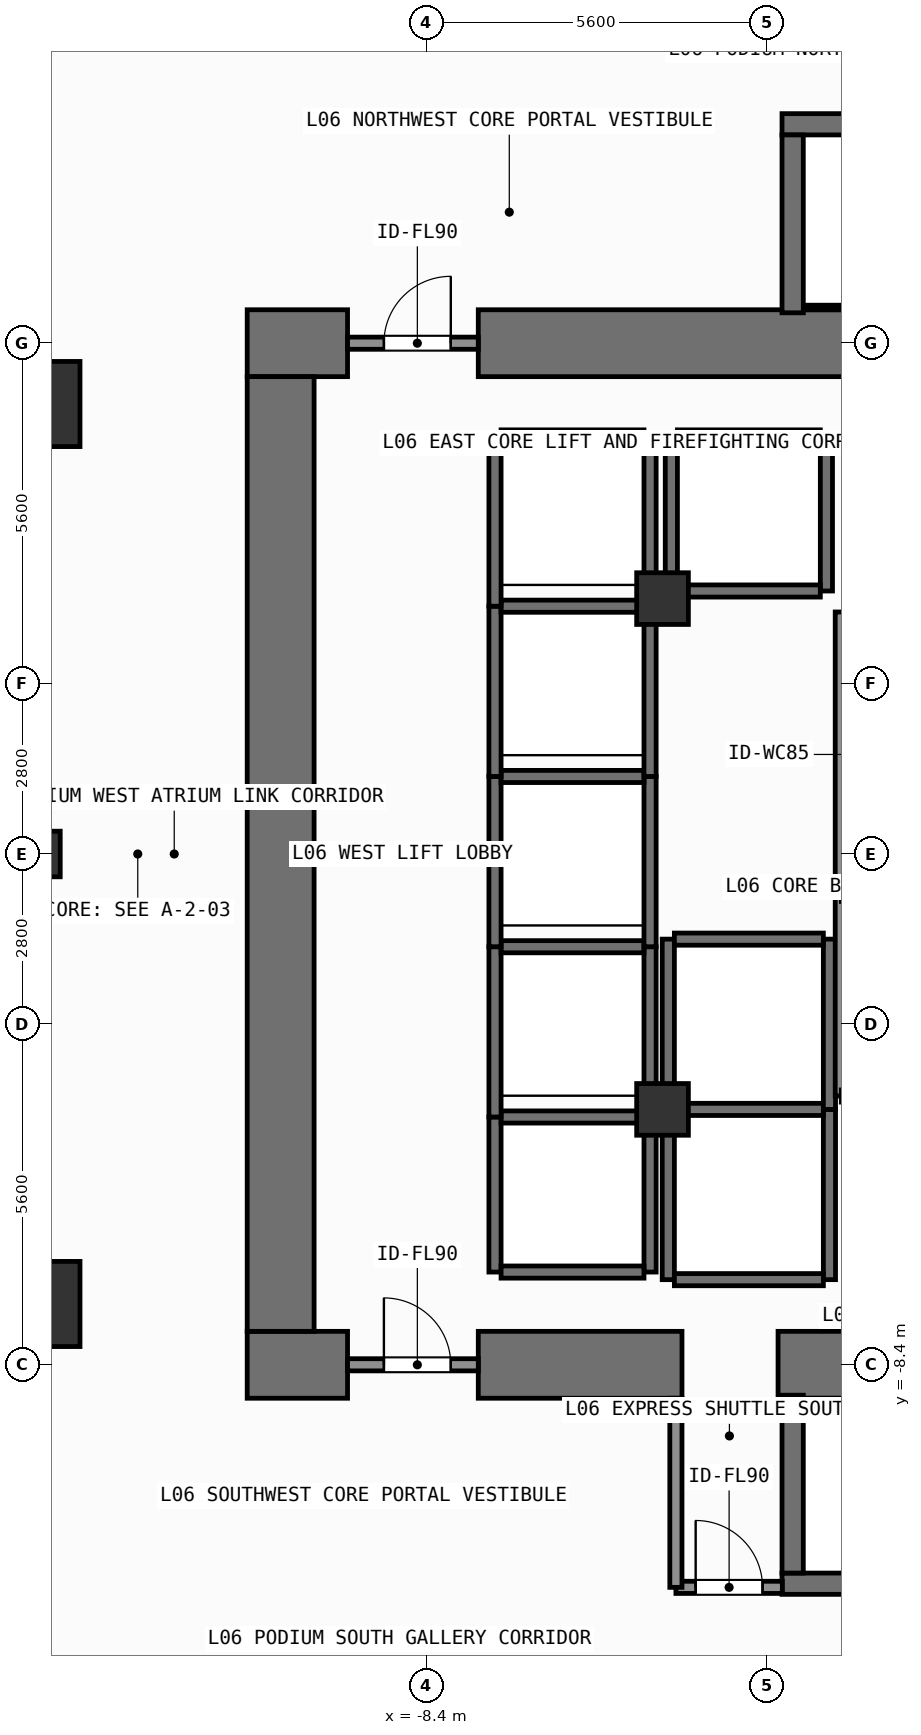
"""IFC4 building model, lengths in metres.
Left out: names, types, materials, properties, quantities, classifications, styles, units other than length and angle.
Written with IfcOpenShell. Run it as: python <this file> out.ifc"""

import sys

from ifc_helpers import new_model, si_unit, direction, frame, frame_2d, origin, origin_2d, place, context, subcontext, project, spatial, rectangle, extrude, element, fill, save


model = new_model("IFC4")
c1 = context("Model", 3, precision=1e-05, world=origin(), true_north=direction((0.0, 1.0)))
c2 = subcontext(c1, "Body", "Model", "MODEL_VIEW")
j1 = project(units=[si_unit("LENGTHUNIT", "METRE"), si_unit("PLANEANGLEUNIT", "RADIAN")], contexts=[c1])
p1 = place(None, origin())
s1 = spatial("IfcSite", under=j1, at=p1, CompositionType="ELEMENT")
p2 = place(p1, origin())
s2 = spatial("IfcBuilding", under=s1, at=p2, CompositionType="ELEMENT")
p3 = place(p2, frame((0.0, 0.0, 21.6)))
s3 = spatial("IfcBuildingStorey", under=s2, at=p3, CompositionType="ELEMENT", Elevation=21.6)
p4 = place(p3, frame((-11.35, -8.4, 0.0), z_axis=(0.0, 0.0, 1.0), x_axis=(1.0, 0.0, 0.0)))
e1 = element("IfcWall", 1, at=p4, inside=s3, PredefinedType="SHEAR", context=c2, shape_type="SweptSolid", body=[
    extrude(rectangle(XDim=1.65, YDim=1.1, at=frame_2d((0.825, 0.0))), origin(), (0.0, 0.0, 1.0), 4.8),
])
p5 = place(p3, frame((-7.55, -8.4, 0.0), z_axis=(0.0, 0.0, 1.0), x_axis=(1.0, 0.0, 0.0)))
e2 = element("IfcWall", 2, at=p5, inside=s3, PredefinedType="SHEAR", context=c2, shape_type="SweptSolid", body=[
    extrude(rectangle(XDim=3.35, YDim=1.1, at=frame_2d((1.675, 0.0))), origin(), (0.0, 0.0, 1.0), 4.8),
])
p6 = place(p3, frame((-2.62, -8.4, 0.0), z_axis=(0.0, 0.0, 1.0), x_axis=(1.0, 0.0, 0.0)))
e3 = element("IfcWall", 3, at=p6, inside=s3, PredefinedType="SHEAR", context=c2, shape_type="SweptSolid", body=[
    extrude(rectangle(XDim=7.27, YDim=1.1, at=frame_2d((3.635, 0.0))), origin(), (0.0, 0.0, 1.0), 4.8),
])
p7 = place(p3, frame((-11.35, 8.4, 0.0), z_axis=(0.0, 0.0, 1.0), x_axis=(1.0, 0.0, 0.0)))
e4 = element("IfcWall", 4, at=p7, inside=s3, PredefinedType="SHEAR", context=c2, shape_type="SweptSolid", body=[
    extrude(rectangle(XDim=1.65, YDim=1.1, at=frame_2d((0.825, 0.0))), origin(), (0.0, 0.0, 1.0), 4.8),
])
p8 = place(p3, frame((-7.55, 8.4, 0.0), z_axis=(0.0, 0.0, 1.0), x_axis=(1.0, 0.0, 0.0)))
e5 = element("IfcWall", 5, at=p8, inside=s3, PredefinedType="SHEAR", context=c2, shape_type="SweptSolid", body=[
    extrude(rectangle(XDim=16.5, YDim=1.1, at=frame_2d((8.25, 0.0))), origin(), (0.0, 0.0, 1.0), 4.8),
])
p9 = place(p3, frame((-10.8, -7.85, 0.0), z_axis=(0.0, 0.0, 1.0), x_axis=(0.0, 1.0, 0.0)))
e6 = element("IfcWall", 6, at=p9, inside=s3, PredefinedType="SHEAR", context=c2, shape_type="SweptSolid", body=[
    extrude(rectangle(XDim=15.7, YDim=1.1, at=frame_2d((7.85, 0.0))), origin(), (0.0, 0.0, 1.0), 4.8),
])
p10 = place(p3, frame((-2.555, -12.0, 0.0), z_axis=(0.0, 0.0, 1.0), x_axis=(1.0, 0.0, 0.0)))
e7 = element("IfcWall", 7, at=p10, inside=s3, PredefinedType="SHEAR", context=c2, shape_type="SweptSolid", body=[
    extrude(rectangle(XDim=7.31, YDim=0.35, at=frame_2d((3.655, 0.0))), origin(), (0.0, 0.0, 1.0), 4.8),
])
p11 = place(p3, frame((-2.2, -8.988, 0.0), z_axis=(0.0, 0.0, 1.0), x_axis=(1.0, 0.0, 0.0)))
e8 = element("IfcWall", 8, at=p11, inside=s3, PredefinedType="SHEAR", context=c2, shape_type="SweptSolid", body=[
    extrude(rectangle(XDim=6.6, YDim=0.075, at=frame_2d((3.3, 0.0))), origin(), (0.0, 0.0, 1.0), 4.8),
])
p12 = place(p3, frame((-2.38, -11.825, 0.0), z_axis=(0.0, 0.0, 1.0), x_axis=(0.0, 1.0, 0.0)))
e9 = element("IfcWall", 9, at=p12, inside=s3, PredefinedType="SHEAR", context=c2, shape_type="SweptSolid", body=[
    extrude(rectangle(XDim=2.925, YDim=0.35, at=frame_2d((1.462, 0.0))), origin(), (0.0, 0.0, 1.0), 4.8),
])
p13 = place(p3, frame((-2.555, 12.0, 0.0), z_axis=(0.0, 0.0, 1.0), x_axis=(1.0, 0.0, 0.0)))
e10 = element("IfcWall", 10, at=p13, inside=s3, PredefinedType="SHEAR", context=c2, shape_type="SweptSolid", body=[
    extrude(rectangle(XDim=7.31, YDim=0.35, at=frame_2d((3.655, 0.0))), origin(), (0.0, 0.0, 1.0), 4.8),
])
p14 = place(p3, frame((-2.2, 8.988, 0.0), z_axis=(0.0, 0.0, 1.0), x_axis=(1.0, 0.0, 0.0)))
e11 = element("IfcWall", 11, at=p14, inside=s3, PredefinedType="SHEAR", context=c2, shape_type="SweptSolid", body=[
    extrude(rectangle(XDim=6.6, YDim=0.075, at=frame_2d((3.3, 0.0))), origin(), (0.0, 0.0, 1.0), 4.8),
])
p15 = place(p3, frame((-2.38, 8.9, 0.0), z_axis=(0.0, 0.0, 1.0), x_axis=(0.0, 1.0, 0.0)))
e12 = element("IfcWall", 12, at=p15, inside=s3, PredefinedType="SHEAR", context=c2, shape_type="SweptSolid", body=[
    extrude(rectangle(XDim=2.925, YDim=0.35, at=frame_2d((1.462, 0.0))), origin(), (0.0, 0.0, 1.0), 4.8),
])
for number, where, z_axis, x_axis in (
    (13, (-14.8, -7.4, 0.0), (0.0, 0.0, 1.0), (1.0, 0.0, 0.0)),
    (14, (-14.8, 7.4, 0.0), (0.0, 0.0, 1.0), (1.0, 0.0, 0.0)),
):
    element("IfcColumn", number, at=place(p3, frame(where, z_axis=z_axis, x_axis=x_axis)), inside=s3, PredefinedType="COLUMN", context=c2, shape_type="SweptSolid", body=[
        extrude(rectangle(XDim=1.4, YDim=1.4, at=origin_2d()), origin(), (0.0, 0.0, 1.0), 4.8),
    ])
for number, where, z_axis, x_axis in (
    (15, (-4.52, -4.2, 0.0), (0.0, 0.0, 1.0), (1.0, 0.0, 0.0)),
    (16, (-4.52, 4.2, 0.0), (0.0, 0.0, 1.0), (1.0, 0.0, 0.0)),
):
    element("IfcColumn", number, at=place(p3, frame(where, z_axis=z_axis, x_axis=x_axis)), inside=s3, PredefinedType="COLUMN", context=c2, shape_type="SweptSolid", body=[
        extrude(rectangle(XDim=0.85, YDim=0.85, at=origin_2d()), origin(), (0.0, 0.0, 1.0), 4.8),
    ])
p16 = place(p3, frame((-14.8, 0.0, 0.0), z_axis=(0.0, 0.0, 1.0), x_axis=(1.0, 0.0, 0.0)))
e17 = element("IfcColumn", 17, at=p16, inside=s3, PredefinedType="COLUMN", context=c2, shape_type="SweptSolid", body=[
    extrude(rectangle(XDim=0.75, YDim=0.75, at=origin_2d()), origin(), (0.0, 0.0, 1.0), 4.8),
])
for number, where, z_axis, x_axis in (
    (18, (-7.275, -6.875, 0.0), (0.0, 0.0, 1.0), (0.0, 1.0, 0.0)),
    (19, (-4.725, -6.875, 0.0), (0.0, 0.0, 1.0), (0.0, 1.0, 0.0)),
):
    element("IfcWall", number, at=place(p3, frame(where, z_axis=z_axis, x_axis=x_axis)), inside=s3, PredefinedType="SHEAR", context=c2, shape_type="SweptSolid", body=[
        extrude(rectangle(XDim=2.55, YDim=0.2, at=frame_2d((1.275, 0.0))), origin(), (0.0, 0.0, 1.0), 4.48),
    ])
for number, where, z_axis, x_axis in (
    (20, (-7.175, -6.875, 0.0), (0.0, 0.0, 1.0), (1.0, 0.0, 0.0)),
    (21, (-7.175, -4.325, 0.0), (0.0, 0.0, 1.0), (1.0, 0.0, 0.0)),
):
    element("IfcWall", number, at=place(p3, frame(where, z_axis=z_axis, x_axis=x_axis)), inside=s3, PredefinedType="SHEAR", context=c2, shape_type="SweptSolid", body=[
        extrude(rectangle(XDim=2.35, YDim=0.2, at=frame_2d((1.175, 0.0))), origin(), (0.0, 0.0, 1.0), 4.48),
    ])
for number, where, z_axis, x_axis in (
    (22, (-7.275, -4.325, 0.0), (0.0, 0.0, 1.0), (0.0, 1.0, 0.0)),
    (23, (-4.725, -4.325, 0.0), (0.0, 0.0, 1.0), (0.0, 1.0, 0.0)),
):
    element("IfcWall", number, at=place(p3, frame(where, z_axis=z_axis, x_axis=x_axis)), inside=s3, PredefinedType="SHEAR", context=c2, shape_type="SweptSolid", body=[
        extrude(rectangle(XDim=2.8, YDim=0.2, at=frame_2d((1.4, 0.0))), origin(), (0.0, 0.0, 1.0), 4.48),
    ])
p17 = place(p3, frame((-7.175, -1.525, 0.0), z_axis=(0.0, 0.0, 1.0), x_axis=(1.0, 0.0, 0.0)))
e24 = element("IfcWall", 24, at=p17, inside=s3, PredefinedType="SHEAR", context=c2, shape_type="SweptSolid", body=[
    extrude(rectangle(XDim=2.35, YDim=0.2, at=frame_2d((1.175, 0.0))), origin(), (0.0, 0.0, 1.0), 4.48),
])
for number, where, z_axis, x_axis in (
    (25, (-7.275, -1.525, 0.0), (0.0, 0.0, 1.0), (0.0, 1.0, 0.0)),
    (26, (-4.725, -1.525, 0.0), (0.0, 0.0, 1.0), (0.0, 1.0, 0.0)),
):
    element("IfcWall", number, at=place(p3, frame(where, z_axis=z_axis, x_axis=x_axis)), inside=s3, PredefinedType="SHEAR", context=c2, shape_type="SweptSolid", body=[
        extrude(rectangle(XDim=2.8, YDim=0.2, at=frame_2d((1.4, 0.0))), origin(), (0.0, 0.0, 1.0), 4.48),
    ])
p18 = place(p3, frame((-7.175, 1.275, 0.0), z_axis=(0.0, 0.0, 1.0), x_axis=(1.0, 0.0, 0.0)))
e27 = element("IfcWall", 27, at=p18, inside=s3, PredefinedType="SHEAR", context=c2, shape_type="SweptSolid", body=[
    extrude(rectangle(XDim=2.35, YDim=0.2, at=frame_2d((1.175, 0.0))), origin(), (0.0, 0.0, 1.0), 4.48),
])
for number, where, z_axis, x_axis in (
    (28, (-7.275, 1.275, 0.0), (0.0, 0.0, 1.0), (0.0, 1.0, 0.0)),
    (29, (-4.725, 1.275, 0.0), (0.0, 0.0, 1.0), (0.0, 1.0, 0.0)),
):
    element("IfcWall", number, at=place(p3, frame(where, z_axis=z_axis, x_axis=x_axis)), inside=s3, PredefinedType="SHEAR", context=c2, shape_type="SweptSolid", body=[
        extrude(rectangle(XDim=2.8, YDim=0.2, at=frame_2d((1.4, 0.0))), origin(), (0.0, 0.0, 1.0), 4.48),
    ])
p19 = place(p3, frame((-7.175, 4.075, 0.0), z_axis=(0.0, 0.0, 1.0), x_axis=(1.0, 0.0, 0.0)))
e30 = element("IfcWall", 30, at=p19, inside=s3, PredefinedType="SHEAR", context=c2, shape_type="SweptSolid", body=[
    extrude(rectangle(XDim=2.35, YDim=0.2, at=frame_2d((1.175, 0.0))), origin(), (0.0, 0.0, 1.0), 4.48),
])
for number, where, z_axis, x_axis in (
    (31, (-7.275, 4.075, 0.0), (0.0, 0.0, 1.0), (0.0, 1.0, 0.0)),
    (32, (-4.725, 4.075, 0.0), (0.0, 0.0, 1.0), (0.0, 1.0, 0.0)),
):
    element("IfcWall", number, at=place(p3, frame(where, z_axis=z_axis, x_axis=x_axis)), inside=s3, PredefinedType="SHEAR", context=c2, shape_type="SweptSolid", body=[
        extrude(rectangle(XDim=2.8, YDim=0.2, at=frame_2d((1.4, 0.0))), origin(), (0.0, 0.0, 1.0), 4.48),
    ])
p20 = place(p3, frame((-7.175, 6.875, 0.0), z_axis=(0.0, 0.0, 1.0), x_axis=(1.0, 0.0, 0.0)))
e33 = element("IfcWall", 33, at=p20, inside=s3, PredefinedType="SHEAR", context=c2, shape_type="SweptSolid", body=[
    extrude(rectangle(XDim=2.35, YDim=0.2, at=frame_2d((1.175, 0.0))), origin(), (0.0, 0.0, 1.0), 4.48),
])
for number, where, z_axis, x_axis in (
    (34, (-4.375, 4.325, 0.0), (0.0, 0.0, 1.0), (0.0, 1.0, 0.0)),
    (35, (-1.825, 4.325, 0.0), (0.0, 0.0, 1.0), (0.0, 1.0, 0.0)),
):
    element("IfcWall", number, at=place(p3, frame(where, z_axis=z_axis, x_axis=x_axis)), inside=s3, PredefinedType="SHEAR", context=c2, shape_type="SweptSolid", body=[
        extrude(rectangle(XDim=2.55, YDim=0.2, at=frame_2d((1.275, 0.0))), origin(), (0.0, 0.0, 1.0), 4.48),
    ])
for number, where, z_axis, x_axis in (
    (36, (-4.275, 4.325, 0.0), (0.0, 0.0, 1.0), (1.0, 0.0, 0.0)),
    (37, (-4.275, 6.875, 0.0), (0.0, 0.0, 1.0), (1.0, 0.0, 0.0)),
):
    element("IfcWall", number, at=place(p3, frame(where, z_axis=z_axis, x_axis=x_axis)), inside=s3, PredefinedType="SHEAR", context=c2, shape_type="SweptSolid", body=[
        extrude(rectangle(XDim=2.35, YDim=0.2, at=frame_2d((1.175, 0.0))), origin(), (0.0, 0.0, 1.0), 4.48),
    ])
for number, where, z_axis, x_axis in (
    (38, (-4.425, -7.0, 0.0), (0.0, 0.0, 1.0), (0.0, 1.0, 0.0)),
    (39, (-1.775, -7.0, 0.0), (0.0, 0.0, 1.0), (0.0, 1.0, 0.0)),
):
    element("IfcWall", number, at=place(p3, frame(where, z_axis=z_axis, x_axis=x_axis)), inside=s3, PredefinedType="SHEAR", context=c2, shape_type="SweptSolid", body=[
        extrude(rectangle(XDim=2.8, YDim=0.2, at=frame_2d((1.4, 0.0))), origin(), (0.0, 0.0, 1.0), 4.48),
    ])
for number, where, z_axis, x_axis in (
    (40, (-4.325, -7.0, 0.0), (0.0, 0.0, 1.0), (1.0, 0.0, 0.0)),
    (41, (-4.325, -4.2, 0.0), (0.0, 0.0, 1.0), (1.0, 0.0, 0.0)),
):
    element("IfcWall", number, at=place(p3, frame(where, z_axis=z_axis, x_axis=x_axis)), inside=s3, PredefinedType="SHEAR", context=c2, shape_type="SweptSolid", body=[
        extrude(rectangle(XDim=2.45, YDim=0.2, at=frame_2d((1.225, 0.0))), origin(), (0.0, 0.0, 1.0), 4.48),
    ])
for number, where, z_axis, x_axis in (
    (42, (-4.425, -4.2, 0.0), (0.0, 0.0, 1.0), (0.0, 1.0, 0.0)),
    (43, (-1.775, -4.2, 0.0), (0.0, 0.0, 1.0), (0.0, 1.0, 0.0)),
):
    element("IfcWall", number, at=place(p3, frame(where, z_axis=z_axis, x_axis=x_axis)), inside=s3, PredefinedType="SHEAR", context=c2, shape_type="SweptSolid", body=[
        extrude(rectangle(XDim=2.8, YDim=0.2, at=frame_2d((1.4, 0.0))), origin(), (0.0, 0.0, 1.0), 4.48),
    ])
p21 = place(p3, frame((-4.325, -1.4, 0.0), z_axis=(0.0, 0.0, 1.0), x_axis=(1.0, 0.0, 0.0)))
e44 = element("IfcWall", 44, at=p21, inside=s3, PredefinedType="SHEAR", context=c2, shape_type="SweptSolid", body=[
    extrude(rectangle(XDim=2.45, YDim=0.2, at=frame_2d((1.225, 0.0))), origin(), (0.0, 0.0, 1.0), 4.48),
])
p22 = place(p3, frame((-9.7, -8.4, 0.0), z_axis=(0.0, 0.0, 1.0), x_axis=(1.0, 0.0, 0.0)))
e45 = element("IfcWall", 45, at=p22, inside=s3, PredefinedType="SOLIDWALL", context=c2, shape_type="SweptSolid", body=[
    extrude(rectangle(XDim=2.15, YDim=0.2, at=frame_2d((1.075, 0.0))), origin(), (0.0, 0.0, 1.0), 3.52),
])
p23 = place(p22, frame((0.598, 0.0, 0.0)))
e46 = element("IfcOpeningElement", 46, at=p23, cuts=e45, PredefinedType="OPENING", context=c2, shape_type="SweptSolid", body=[
    extrude(rectangle(XDim=1.1, YDim=2.15, at=frame_2d((0.55, 1.075))), frame((0.0, 0.11, 0.0), z_axis=(0.0, -1.0, 0.0), x_axis=(1.0, 0.0, 0.0)), (0.0, 0.0, 1.0), 0.22),
])
p24 = place(p3, frame((-9.7, 8.4, 0.0), z_axis=(0.0, 0.0, 1.0), x_axis=(1.0, 0.0, 0.0)))
e47 = element("IfcWall", 47, at=p24, inside=s3, PredefinedType="SOLIDWALL", context=c2, shape_type="SweptSolid", body=[
    extrude(rectangle(XDim=2.15, YDim=0.2, at=frame_2d((1.075, 0.0))), origin(), (0.0, 0.0, 1.0), 3.52),
])
p25 = place(p24, frame((0.598, 0.0, 0.0)))
e48 = element("IfcOpeningElement", 48, at=p25, cuts=e47, PredefinedType="OPENING", context=c2, shape_type="SweptSolid", body=[
    extrude(rectangle(XDim=1.1, YDim=2.15, at=frame_2d((0.55, 1.075))), frame((0.0, 0.11, 0.0), z_axis=(0.0, -1.0, 0.0), x_axis=(1.0, 0.0, 0.0)), (0.0, 0.0, 1.0), 0.22),
])
p26 = place(p3, frame((-4.3, -12.06, 0.0), z_axis=(0.0, 0.0, 1.0), x_axis=(1.0, 0.0, 0.0)))
e49 = element("IfcWall", 49, at=p26, inside=s3, PredefinedType="SOLIDWALL", context=c2, shape_type="SweptSolid", body=[
    extrude(rectangle(XDim=1.75, YDim=0.2, at=frame_2d((0.875, 0.0))), origin(), (0.0, 0.0, 1.0), 4.48),
])
p27 = place(p26, frame((0.325, 0.0, 0.0)))
e50 = element("IfcOpeningElement", 50, at=p27, cuts=e49, PredefinedType="OPENING", context=c2, shape_type="SweptSolid", body=[
    extrude(rectangle(XDim=1.1, YDim=2.15, at=frame_2d((0.55, 1.075))), frame((0.0, 0.11, 0.0), z_axis=(0.0, -1.0, 0.0), x_axis=(1.0, 0.0, 0.0)), (0.0, 0.0, 1.0), 0.22),
])
p28 = place(p3, frame((-4.3, -12.06, 0.0), z_axis=(0.0, 0.0, 1.0), x_axis=(0.0, 1.0, 0.0)))
e51 = element("IfcWall", 51, at=p28, inside=s3, PredefinedType="SOLIDWALL", context=c2, shape_type="SweptSolid", body=[
    extrude(rectangle(XDim=3.11, YDim=0.2, at=frame_2d((1.555, 0.0))), origin(), (0.0, 0.0, 1.0), 4.48),
])
p29 = place(p3, frame((-1.58, -3.98, 0.0), z_axis=(0.0, 0.0, 1.0), x_axis=(0.0, 1.0, 0.0)))
e52 = element("IfcWall", 52, at=p29, inside=s3, PredefinedType="SOLIDWALL", context=c2, shape_type="SweptSolid", body=[
    extrude(rectangle(XDim=7.96, YDim=0.2, at=frame_2d((3.98, 0.0))), origin(), (0.0, 0.0, 1.0), 4.48),
])
p30 = place(p23, origin())
e53 = element("IfcDoor", 53, at=p30, inside=s3, OperationType="SINGLE_SWING_LEFT", PredefinedType="DOOR", context=c2, shape_type="SweptSolid", body=[
    extrude(rectangle(XDim=1.1, YDim=2.15, at=frame_2d((0.55, 1.075))), frame((0.0, 0.025, 0.0), z_axis=(0.0, -1.0, 0.0), x_axis=(1.0, 0.0, 0.0)), (0.0, 0.0, 1.0), 0.05),
])
fill(e46, e53)
p31 = place(p25, origin())
e54 = element("IfcDoor", 54, at=p31, inside=s3, OperationType="SINGLE_SWING_RIGHT", PredefinedType="DOOR", context=c2, shape_type="SweptSolid", body=[
    extrude(rectangle(XDim=1.1, YDim=2.15, at=frame_2d((0.55, 1.075))), frame((0.0, 0.025, 0.0), z_axis=(0.0, -1.0, 0.0), x_axis=(1.0, 0.0, 0.0)), (0.0, 0.0, 1.0), 0.05),
])
fill(e48, e54)
p32 = place(p27, origin())
e55 = element("IfcDoor", 55, at=p32, inside=s3, OperationType="SINGLE_SWING_LEFT", PredefinedType="DOOR", context=c2, shape_type="SweptSolid", body=[
    extrude(rectangle(XDim=1.1, YDim=2.15, at=frame_2d((0.55, 1.075))), frame((0.0, 0.025, 0.0), z_axis=(0.0, -1.0, 0.0), x_axis=(1.0, 0.0, 0.0)), (0.0, 0.0, 1.0), 0.05),
])
fill(e50, e55)
save(model, sys.argv[1])
